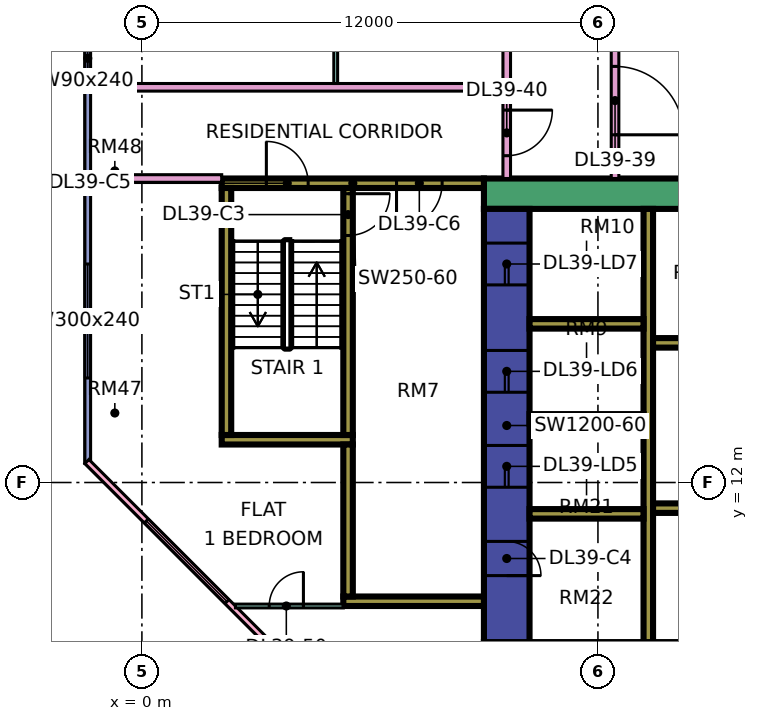
"""IFC4 building model, lengths in metres.
Left out: names, types, materials, properties, quantities, classifications, styles, units other than length and angle.
Written with IfcOpenShell. Run it as: python <this file> out.ifc"""

import sys

from ifc_helpers import new_model, si_unit, direction, frame, frame_2d, origin, place, context, subcontext, project, spatial, rectangle, extrude, element, fill, save


model = new_model("IFC4")
c1 = context("Model", 3, precision=1e-05, world=origin(), true_north=direction((0.0, 1.0)))
c2 = subcontext(c1, "Body", "Model", "MODEL_VIEW")
j1 = project(units=[si_unit("LENGTHUNIT", "METRE"), si_unit("PLANEANGLEUNIT", "RADIAN")], contexts=[c1])
p1 = place(None, origin())
s1 = spatial("IfcSite", under=j1, at=p1, CompositionType="ELEMENT")
p2 = place(p1, origin())
s2 = spatial("IfcBuilding", under=s1, at=p2, CompositionType="ELEMENT")
p3 = place(p2, frame((0.0, 0.0, 172.4)))
s3 = spatial("IfcBuildingStorey", under=s2, at=p3, CompositionType="ELEMENT", Elevation=172.4)
p4 = place(p3, frame((9.0, 19.6, 0.0), z_axis=(0.0, 0.0, 1.0), x_axis=(1.0, 0.0, 0.0)))
e1 = element("IfcWall", 1, at=p4, inside=s3, PredefinedType="SHEAR", context=c2, shape_type="SweptSolid", body=[
    extrude(rectangle(XDim=25.0, YDim=0.8, at=frame_2d((12.5, 0.0))), origin(), (0.0, 0.0, 1.0), 3.75),
])
p5 = place(p4, frame((19.1, 0.0, 0.0)))
e2 = element("IfcOpeningElement", 2, at=p5, cuts=e1, PredefinedType="OPENING", context=c2, shape_type="SweptSolid", body=[
    extrude(rectangle(XDim=1.8, YDim=2.4, at=frame_2d((0.9, 1.2))), frame((0.0, 0.41, 0.0), z_axis=(0.0, -1.0, 0.0), x_axis=(1.0, 0.0, 0.0)), (0.0, 0.0, 1.0), 0.82),
])
p6 = place(p3, frame((9.6, 7.8, 0.0), z_axis=(0.0, 0.0, 1.0), x_axis=(0.0, 1.0, 0.0)))
e3 = element("IfcWall", 3, at=p6, inside=s3, PredefinedType="SHEAR", context=c2, shape_type="SweptSolid", body=[
    extrude(rectangle(XDim=11.4, YDim=1.2, at=frame_2d((5.7, 0.0))), origin(), (0.0, 0.0, 1.0), 3.75),
])
p7 = place(p6, frame((4.075, 0.0, 0.0)))
e4 = element("IfcOpeningElement", 4, at=p7, cuts=e3, PredefinedType="OPENING", context=c2, shape_type="SweptSolid", body=[
    extrude(rectangle(XDim=1.1, YDim=2.2, at=frame_2d((0.55, 1.1))), frame((0.0, 0.61, 0.0), z_axis=(0.0, -1.0, 0.0), x_axis=(1.0, 0.0, 0.0)), (0.0, 0.0, 1.0), 1.22),
])
p8 = place(p6, frame((6.575, 0.0, 0.0)))
e5 = element("IfcOpeningElement", 5, at=p8, cuts=e3, PredefinedType="OPENING", context=c2, shape_type="SweptSolid", body=[
    extrude(rectangle(XDim=1.1, YDim=2.2, at=frame_2d((0.55, 1.1))), frame((0.0, 0.61, 0.0), z_axis=(0.0, -1.0, 0.0), x_axis=(1.0, 0.0, 0.0)), (0.0, 0.0, 1.0), 1.22),
])
p9 = place(p6, frame((9.4, 0.0, 0.0)))
e6 = element("IfcOpeningElement", 6, at=p9, cuts=e3, PredefinedType="OPENING", context=c2, shape_type="SweptSolid", body=[
    extrude(rectangle(XDim=1.1, YDim=2.2, at=frame_2d((0.55, 1.1))), frame((0.0, 0.61, 0.0), z_axis=(0.0, -1.0, 0.0), x_axis=(1.0, 0.0, 0.0)), (0.0, 0.0, 1.0), 1.22),
])
p10 = place(p6, frame((1.75, 0.0, 0.0)))
e7 = element("IfcOpeningElement", 7, at=p10, cuts=e3, PredefinedType="OPENING", context=c2, shape_type="SweptSolid", body=[
    extrude(rectangle(XDim=0.9, YDim=2.1, at=frame_2d((0.45, 1.05))), frame((0.0, 0.61, 0.0), z_axis=(0.0, -1.0, 0.0), x_axis=(1.0, 0.0, 0.0)), (0.0, 0.0, 1.0), 1.22),
])
p11 = place(p3, frame((13.325, 7.8, 0.0), z_axis=(0.0, 0.0, 1.0), x_axis=(0.0, 1.0, 0.0)))
e8 = element("IfcWall", 8, at=p11, inside=s3, PredefinedType="SHEAR", context=c2, shape_type="SweptSolid", body=[
    extrude(rectangle(XDim=11.4, YDim=0.25, at=frame_2d((5.7, 0.0))), origin(), (0.0, 0.0, 1.0), 3.75),
])
p12 = place(p3, frame((13.45, 11.325, 0.0), z_axis=(0.0, 0.0, 1.0), x_axis=(1.0, 0.0, 0.0)))
e9 = element("IfcWall", 9, at=p12, inside=s3, PredefinedType="SHEAR", context=c2, shape_type="SweptSolid", body=[
    extrude(rectangle(XDim=19.75, YDim=0.25, at=frame_2d((9.875, 0.0))), origin(), (0.0, 0.0, 1.0), 3.75),
])
p13 = place(p12, frame((11.65, 0.0, 0.0)))
e10 = element("IfcOpeningElement", 10, at=p13, cuts=e9, PredefinedType="OPENING", context=c2, shape_type="SweptSolid", body=[
    extrude(rectangle(XDim=1.2, YDim=2.2, at=frame_2d((0.6, 1.1))), frame((0.0, 0.135, 0.0), z_axis=(0.0, -1.0, 0.0), x_axis=(1.0, 0.0, 0.0)), (0.0, 0.0, 1.0), 0.27),
])
p14 = place(p12, frame((14.4, 0.0, 0.0)))
e11 = element("IfcOpeningElement", 11, at=p14, cuts=e9, PredefinedType="OPENING", context=c2, shape_type="SweptSolid", body=[
    extrude(rectangle(XDim=1.2, YDim=2.2, at=frame_2d((0.6, 1.1))), frame((0.0, 0.135, 0.0), z_axis=(0.0, -1.0, 0.0), x_axis=(1.0, 0.0, 0.0)), (0.0, 0.0, 1.0), 0.27),
])
p15 = place(p12, frame((17.15, 0.0, 0.0)))
e12 = element("IfcOpeningElement", 12, at=p15, cuts=e9, PredefinedType="OPENING", context=c2, shape_type="SweptSolid", body=[
    extrude(rectangle(XDim=1.2, YDim=2.2, at=frame_2d((0.6, 1.1))), frame((0.0, 0.135, 0.0), z_axis=(0.0, -1.0, 0.0), x_axis=(1.0, 0.0, 0.0)), (0.0, 0.0, 1.0), 0.27),
])
p16 = place(p12, frame((2.8, 0.0, 0.0)))
e13 = element("IfcOpeningElement", 13, at=p16, cuts=e9, PredefinedType="OPENING", context=c2, shape_type="SweptSolid", body=[
    extrude(rectangle(XDim=0.9, YDim=2.1, at=frame_2d((0.45, 1.05))), frame((0.0, 0.135, 0.0), z_axis=(0.0, -1.0, 0.0), x_axis=(1.0, 0.0, 0.0)), (0.0, 0.0, 1.0), 0.27),
])
p17 = place(p12, frame((8.175, 0.0, 0.0)))
e14 = element("IfcOpeningElement", 14, at=p17, cuts=e9, PredefinedType="OPENING", context=c2, shape_type="SweptSolid", body=[
    extrude(rectangle(XDim=0.9, YDim=2.1, at=frame_2d((0.45, 1.05))), frame((0.0, 0.135, 0.0), z_axis=(0.0, -1.0, 0.0), x_axis=(1.0, 0.0, 0.0)), (0.0, 0.0, 1.0), 0.27),
])
p18 = place(p3, frame((13.45, 15.675, 0.0), z_axis=(0.0, 0.0, 1.0), x_axis=(1.0, 0.0, 0.0)))
e15 = element("IfcWall", 15, at=p18, inside=s3, PredefinedType="SHEAR", context=c2, shape_type="SweptSolid", body=[
    extrude(rectangle(XDim=13.75, YDim=0.25, at=frame_2d((6.875, 0.0))), origin(), (0.0, 0.0, 1.0), 3.75),
])
p19 = place(p18, frame((11.65, 0.0, 0.0)))
e16 = element("IfcOpeningElement", 16, at=p19, cuts=e15, PredefinedType="OPENING", context=c2, shape_type="SweptSolid", body=[
    extrude(rectangle(XDim=1.2, YDim=2.2, at=frame_2d((0.6, 1.1))), frame((0.0, 0.135, 0.0), z_axis=(0.0, -1.0, 0.0), x_axis=(1.0, 0.0, 0.0)), (0.0, 0.0, 1.0), 0.27),
])
for number, where, z_axis, x_axis in (
    (17, (10.2, 11.175, 0.0), (0.0, 0.0, 1.0), (1.0, 0.0, 0.0)),
    (18, (10.2, 13.675, 0.0), (0.0, 0.0, 1.0), (1.0, 0.0, 0.0)),
    (19, (10.2, 16.175, 0.0), (0.0, 0.0, 1.0), (1.0, 0.0, 0.0)),
):
    element("IfcWall", number, at=place(p3, frame(where, z_axis=z_axis, x_axis=x_axis)), inside=s3, PredefinedType="SHEAR", context=c2, shape_type="SweptSolid", body=[
        extrude(rectangle(XDim=3.0, YDim=0.25, at=frame_2d((1.5, 0.0))), origin(), (0.0, 0.0, 1.0), 3.75),
    ])
p20 = place(p3, frame((2.1, 19.875, 0.0), z_axis=(0.0, 0.0, 1.0), x_axis=(1.0, 0.0, 0.0)))
e20 = element("IfcWall", 20, at=p20, inside=s3, PredefinedType="SHEAR", context=c2, shape_type="SweptSolid", body=[
    extrude(rectangle(XDim=6.9, YDim=0.25, at=frame_2d((3.45, 0.0))), origin(), (0.0, 0.0, 1.0), 3.75),
])
p21 = place(p20, frame((1.175, 0.0, 0.0)))
e21 = element("IfcOpeningElement", 21, at=p21, cuts=e20, PredefinedType="OPENING", context=c2, shape_type="SweptSolid", body=[
    extrude(rectangle(XDim=1.1, YDim=2.2, at=frame_2d((0.55, 1.1))), frame((0.0, 0.135, 0.0), z_axis=(0.0, -1.0, 0.0), x_axis=(1.0, 0.0, 0.0)), (0.0, 0.0, 1.0), 0.27),
])
p22 = place(p20, frame((4.6, 0.0, 0.0)))
e22 = element("IfcOpeningElement", 22, at=p22, cuts=e20, PredefinedType="OPENING", context=c2, shape_type="SweptSolid", body=[
    extrude(rectangle(XDim=1.2, YDim=2.2, at=frame_2d((0.6, 1.1))), frame((0.0, 0.135, 0.0), z_axis=(0.0, -1.0, 0.0), x_axis=(1.0, 0.0, 0.0)), (0.0, 0.0, 1.0), 0.27),
])
p23 = place(p3, frame((2.1, 13.125, 0.0), z_axis=(0.0, 0.0, 1.0), x_axis=(1.0, 0.0, 0.0)))
e23 = element("IfcWall", 23, at=p23, inside=s3, PredefinedType="SHEAR", context=c2, shape_type="SweptSolid", body=[
    extrude(rectangle(XDim=3.45, YDim=0.25, at=frame_2d((1.725, 0.0))), origin(), (0.0, 0.0, 1.0), 3.75),
])
p24 = place(p3, frame((2.225, 13.25, 0.0), z_axis=(0.0, 0.0, 1.0), x_axis=(0.0, 1.0, 0.0)))
e24 = element("IfcWall", 24, at=p24, inside=s3, PredefinedType="SHEAR", context=c2, shape_type="SweptSolid", body=[
    extrude(rectangle(XDim=6.5, YDim=0.25, at=frame_2d((3.25, 0.0))), origin(), (0.0, 0.0, 1.0), 3.75),
])
p25 = place(p3, frame((5.425, 13.25, 0.0), z_axis=(0.0, 0.0, 1.0), x_axis=(0.0, 1.0, 0.0)))
e25 = element("IfcWall", 25, at=p25, inside=s3, PredefinedType="SHEAR", context=c2, shape_type="SweptSolid", body=[
    extrude(rectangle(XDim=6.5, YDim=0.25, at=frame_2d((3.25, 0.0))), origin(), (0.0, 0.0, 1.0), 3.75),
])
p26 = place(p25, frame((5.25, 0.0, 0.0)))
e26 = element("IfcOpeningElement", 26, at=p26, cuts=e25, PredefinedType="OPENING", context=c2, shape_type="SweptSolid", body=[
    extrude(rectangle(XDim=1.1, YDim=2.2, at=frame_2d((0.55, 1.1))), frame((0.0, 0.135, 0.0), z_axis=(0.0, -1.0, 0.0), x_axis=(1.0, 0.0, 0.0)), (0.0, 0.0, 1.0), 0.27),
])
p27 = place(p3, frame((5.3, 8.875, 0.0), z_axis=(0.0, 0.0, 1.0), x_axis=(1.0, 0.0, 0.0)))
e27 = element("IfcWall", 27, at=p27, inside=s3, PredefinedType="SHEAR", context=c2, shape_type="SweptSolid", body=[
    extrude(rectangle(XDim=3.7, YDim=0.25, at=frame_2d((1.85, 0.0))), origin(), (0.0, 0.0, 1.0), 3.75),
])
p28 = place(p3, frame((5.425, 9.0, 0.0), z_axis=(0.0, 0.0, 1.0), x_axis=(0.0, 1.0, 0.0)))
e28 = element("IfcWall", 28, at=p28, inside=s3, PredefinedType="SHEAR", context=c2, shape_type="SweptSolid", body=[
    extrude(rectangle(XDim=4.0, YDim=0.25, at=frame_2d((2.0, 0.0))), origin(), (0.0, 0.0, 1.0), 3.75),
])
p29 = place(p3, frame((-1.425, 23.925, 0.0), z_axis=(0.0, 0.0, 1.0), x_axis=(0.0, -1.0, 0.0)))
e29 = element("IfcWall", 29, at=p29, inside=s3, PredefinedType="SOLIDWALL", context=c2, shape_type="SweptSolid", body=[
    extrude(rectangle(XDim=11.425, YDim=0.15, at=frame_2d((5.712, 0.0))), origin(), (0.0, 0.0, 1.0), 3.35),
])
p30 = place(p29, frame((0.312, 0.0, 0.45)))
e30 = element("IfcOpeningElement", 30, at=p30, cuts=e29, PredefinedType="OPENING", context=c2, shape_type="SweptSolid", body=[
    extrude(rectangle(XDim=0.9, YDim=2.4, at=frame_2d((0.45, 1.2))), frame((0.0, 0.085, 0.0), z_axis=(0.0, -1.0, 0.0), x_axis=(1.0, 0.0, 0.0)), (0.0, 0.0, 1.0), 0.17),
])
p31 = place(p29, frame((6.175, 0.0, 0.45)))
e31 = element("IfcOpeningElement", 31, at=p31, cuts=e29, PredefinedType="OPENING", context=c2, shape_type="SweptSolid", body=[
    extrude(rectangle(XDim=3.0, YDim=2.4, at=frame_2d((1.5, 1.2))), frame((0.0, 0.085, 0.0), z_axis=(0.0, -1.0, 0.0), x_axis=(1.0, 0.0, 0.0)), (0.0, 0.0, 1.0), 0.17),
])
p32 = place(p3, frame((-1.447, 12.553, 0.0), z_axis=(0.0, 0.0, 1.0), x_axis=(0.707106781187, -0.707106781187, 0.0)))
e32 = element("IfcWall", 32, at=p32, inside=s3, PredefinedType="SOLIDWALL", context=c2, shape_type="SweptSolid", body=[
    extrude(rectangle(XDim=19.799, YDim=0.15, at=frame_2d((9.899, 0.0))), origin(), (0.0, 0.0, 1.0), 3.35),
])
p33 = place(p32, frame((2.212, 0.0, 0.45)))
e33 = element("IfcOpeningElement", 33, at=p33, cuts=e32, PredefinedType="OPENING", context=c2, shape_type="SweptSolid", body=[
    extrude(rectangle(XDim=3.0, YDim=2.4, at=frame_2d((1.5, 1.2))), frame((0.0, 0.085, 0.0), z_axis=(0.0, -1.0, 0.0), x_axis=(1.0, 0.0, 0.0)), (0.0, 0.0, 1.0), 0.17),
])
p34 = place(p32, frame((10.216, 0.0, 0.45)))
e34 = element("IfcOpeningElement", 34, at=p34, cuts=e32, PredefinedType="OPENING", context=c2, shape_type="SweptSolid", body=[
    extrude(rectangle(XDim=3.0, YDim=2.4, at=frame_2d((1.5, 1.2))), frame((0.0, 0.085, 0.0), z_axis=(0.0, -1.0, 0.0), x_axis=(1.0, 0.0, 0.0)), (0.0, 0.0, 1.0), 0.17),
])
p35 = place(p3, frame((-1.35, 20.0, 0.0), z_axis=(0.0, 0.0, 1.0), x_axis=(1.0, 0.0, 0.0)))
e35 = element("IfcWall", 35, at=p35, inside=s3, PredefinedType="PARTITIONING", context=c2, shape_type="SweptSolid", body=[
    extrude(rectangle(XDim=3.45, YDim=0.2, at=frame_2d((1.725, 0.0))), origin(), (0.0, 0.0, 1.0), 3.35),
])
p36 = place(p3, frame((-1.35, 22.4, 0.0), z_axis=(0.0, 0.0, 1.0), x_axis=(1.0, 0.0, 0.0)))
e36 = element("IfcWall", 36, at=p36, inside=s3, PredefinedType="PARTITIONING", context=c2, shape_type="SweptSolid", body=[
    extrude(rectangle(XDim=10.85, YDim=0.2, at=frame_2d((5.425, 0.0))), origin(), (0.0, 0.0, 1.0), 3.35),
])
p37 = place(p3, frame((2.461, 8.75, 0.0), z_axis=(0.0, 0.0, 1.0), x_axis=(1.0, 0.0, 0.0)))
e37 = element("IfcWall", 37, at=p37, inside=s3, PredefinedType="PARTITIONING", context=c2, shape_type="SweptSolid", body=[
    extrude(rectangle(XDim=2.839, YDim=0.1, at=frame_2d((1.419, 0.0))), origin(), (0.0, 0.0, 1.0), 3.35),
])
p38 = place(p37, frame((0.889, 0.0, 0.0)))
e38 = element("IfcOpeningElement", 38, at=p38, cuts=e37, PredefinedType="OPENING", context=c2, shape_type="SweptSolid", body=[
    extrude(rectangle(XDim=0.9, YDim=2.1, at=frame_2d((0.45, 1.05))), frame((0.0, 0.06, 0.0), z_axis=(0.0, -1.0, 0.0), x_axis=(1.0, 0.0, 0.0)), (0.0, 0.0, 1.0), 0.12),
])
p39 = place(p3, frame((5.1, 22.5, 0.0), z_axis=(0.0, 0.0, 1.0), x_axis=(0.0, 1.0, 0.0)))
e39 = element("IfcWall", 39, at=p39, inside=s3, PredefinedType="PARTITIONING", context=c2, shape_type="SweptSolid", body=[
    extrude(rectangle(XDim=4.45, YDim=0.1, at=frame_2d((2.225, 0.0))), origin(), (0.0, 0.0, 1.0), 3.35),
])
p40 = place(p3, frame((9.6, 20.0, 0.0), z_axis=(0.0, 0.0, 1.0), x_axis=(0.0, 1.0, 0.0)))
e40 = element("IfcWall", 40, at=p40, inside=s3, PredefinedType="PARTITIONING", context=c2, shape_type="SweptSolid", body=[
    extrude(rectangle(XDim=42.926, YDim=0.2, at=frame_2d((21.463, 0.0))), origin(), (0.0, 0.0, 1.0), 3.35),
])
p41 = place(p40, frame((31.35, 0.0, 0.0)))
e41 = element("IfcOpeningElement", 41, at=p41, cuts=e40, PredefinedType="OPENING", context=c2, shape_type="SweptSolid", body=[
    extrude(rectangle(XDim=1.0, YDim=2.1, at=frame_2d((0.5, 1.05))), frame((0.0, 0.11, 0.0), z_axis=(0.0, -1.0, 0.0), x_axis=(1.0, 0.0, 0.0)), (0.0, 0.0, 1.0), 0.22),
])
p42 = place(p40, frame((0.6, 0.0, 0.0)))
e42 = element("IfcOpeningElement", 42, at=p42, cuts=e40, PredefinedType="OPENING", context=c2, shape_type="SweptSolid", body=[
    extrude(rectangle(XDim=1.2, YDim=2.1, at=frame_2d((0.6, 1.05))), frame((0.0, 0.11, 0.0), z_axis=(0.0, -1.0, 0.0), x_axis=(1.0, 0.0, 0.0)), (0.0, 0.0, 1.0), 0.22),
])
p43 = place(p40, frame((3.9, 0.0, 0.0)))
e43 = element("IfcOpeningElement", 43, at=p43, cuts=e40, PredefinedType="OPENING", context=c2, shape_type="SweptSolid", body=[
    extrude(rectangle(XDim=1.0, YDim=2.1, at=frame_2d((0.5, 1.05))), frame((0.0, 0.11, 0.0), z_axis=(0.0, -1.0, 0.0), x_axis=(1.0, 0.0, 0.0)), (0.0, 0.0, 1.0), 0.22),
])
p44 = place(p3, frame((12.45, 20.0, 0.0), z_axis=(0.0, 0.0, 1.0), x_axis=(0.0, 1.0, 0.0)))
e44 = element("IfcWall", 44, at=p44, inside=s3, PredefinedType="PARTITIONING", context=c2, shape_type="SweptSolid", body=[
    extrude(rectangle(XDim=43.0, YDim=0.2, at=frame_2d((21.5, 0.0))), origin(), (0.0, 0.0, 1.0), 3.35),
])
p45 = place(p44, frame((5.95, 0.0, 0.0)))
e45 = element("IfcOpeningElement", 45, at=p45, cuts=e44, PredefinedType="OPENING", context=c2, shape_type="SweptSolid", body=[
    extrude(rectangle(XDim=1.0, YDim=2.1, at=frame_2d((0.5, 1.05))), frame((0.0, 0.11, 0.0), z_axis=(0.0, -1.0, 0.0), x_axis=(1.0, 0.0, 0.0)), (0.0, 0.0, 1.0), 0.22),
])
p46 = place(p44, frame((12.0, 0.0, 0.0)))
e46 = element("IfcOpeningElement", 46, at=p46, cuts=e44, PredefinedType="OPENING", context=c2, shape_type="SweptSolid", body=[
    extrude(rectangle(XDim=1.0, YDim=2.1, at=frame_2d((0.5, 1.05))), frame((0.0, 0.11, 0.0), z_axis=(0.0, -1.0, 0.0), x_axis=(1.0, 0.0, 0.0)), (0.0, 0.0, 1.0), 0.22),
])
p47 = place(p44, frame((22.75, 0.0, 0.0)))
e47 = element("IfcOpeningElement", 47, at=p47, cuts=e44, PredefinedType="OPENING", context=c2, shape_type="SweptSolid", body=[
    extrude(rectangle(XDim=1.0, YDim=2.1, at=frame_2d((0.5, 1.05))), frame((0.0, 0.11, 0.0), z_axis=(0.0, -1.0, 0.0), x_axis=(1.0, 0.0, 0.0)), (0.0, 0.0, 1.0), 0.22),
])
p48 = place(p44, frame((34.75, 0.0, 0.0)))
e48 = element("IfcOpeningElement", 48, at=p48, cuts=e44, PredefinedType="OPENING", context=c2, shape_type="SweptSolid", body=[
    extrude(rectangle(XDim=1.0, YDim=2.1, at=frame_2d((0.5, 1.05))), frame((0.0, 0.11, 0.0), z_axis=(0.0, -1.0, 0.0), x_axis=(1.0, 0.0, 0.0)), (0.0, 0.0, 1.0), 0.22),
])
p49 = place(p44, frame((1.15, 0.0, 0.0)))
e49 = element("IfcOpeningElement", 49, at=p49, cuts=e44, PredefinedType="OPENING", context=c2, shape_type="SweptSolid", body=[
    extrude(rectangle(XDim=1.8, YDim=2.1, at=frame_2d((0.9, 1.05))), frame((0.0, 0.11, 0.0), z_axis=(0.0, -1.0, 0.0), x_axis=(1.0, 0.0, 0.0)), (0.0, 0.0, 1.0), 0.22),
])
p50 = place(p44, frame((28.6, 0.0, 0.0)))
e50 = element("IfcOpeningElement", 50, at=p50, cuts=e44, PredefinedType="OPENING", context=c2, shape_type="SweptSolid", body=[
    extrude(rectangle(XDim=1.8, YDim=2.1, at=frame_2d((0.9, 1.05))), frame((0.0, 0.11, 0.0), z_axis=(0.0, -1.0, 0.0), x_axis=(1.0, 0.0, 0.0)), (0.0, 0.0, 1.0), 0.22),
])
p51 = place(p30, origin())
e51 = element("IfcWindow", 51, at=p51, inside=s3, PartitioningType="SINGLE_PANEL", PredefinedType="WINDOW", context=c2, shape_type="SweptSolid", body=[
    extrude(rectangle(XDim=0.9, YDim=2.4, at=frame_2d((0.45, 1.2))), frame((0.0, 0.03, 0.0), z_axis=(0.0, -1.0, 0.0), x_axis=(1.0, 0.0, 0.0)), (0.0, 0.0, 1.0), 0.06),
])
fill(e30, e51)
p52 = place(p31, origin())
e52 = element("IfcWindow", 52, at=p52, inside=s3, PartitioningType="SINGLE_PANEL", PredefinedType="WINDOW", context=c2, shape_type="SweptSolid", body=[
    extrude(rectangle(XDim=3.0, YDim=2.4, at=frame_2d((1.5, 1.2))), frame((0.0, 0.03, 0.0), z_axis=(0.0, -1.0, 0.0), x_axis=(1.0, 0.0, 0.0)), (0.0, 0.0, 1.0), 0.06),
])
fill(e31, e52)
p53 = place(p33, origin())
e53 = element("IfcWindow", 53, at=p53, inside=s3, PartitioningType="SINGLE_PANEL", PredefinedType="WINDOW", context=c2, shape_type="SweptSolid", body=[
    extrude(rectangle(XDim=3.0, YDim=2.4, at=frame_2d((1.5, 1.2))), frame((0.0, 0.03, 0.0), z_axis=(0.0, -1.0, 0.0), x_axis=(1.0, 0.0, 0.0)), (0.0, 0.0, 1.0), 0.06),
])
fill(e33, e53)
p54 = place(p7, origin())
e54 = element("IfcDoor", 54, at=p54, inside=s3, OperationType="DOUBLE_DOOR_SLIDING", PredefinedType="DOOR", context=c2, shape_type="SweptSolid", body=[
    extrude(rectangle(XDim=1.1, YDim=2.2, at=frame_2d((0.55, 1.1))), frame((0.0, 0.025, 0.0), z_axis=(0.0, -1.0, 0.0), x_axis=(1.0, 0.0, 0.0)), (0.0, 0.0, 1.0), 0.05),
])
fill(e4, e54)
p55 = place(p8, origin())
e55 = element("IfcDoor", 55, at=p55, inside=s3, OperationType="DOUBLE_DOOR_SLIDING", PredefinedType="DOOR", context=c2, shape_type="SweptSolid", body=[
    extrude(rectangle(XDim=1.1, YDim=2.2, at=frame_2d((0.55, 1.1))), frame((0.0, 0.025, 0.0), z_axis=(0.0, -1.0, 0.0), x_axis=(1.0, 0.0, 0.0)), (0.0, 0.0, 1.0), 0.05),
])
fill(e5, e55)
p56 = place(p9, origin())
e56 = element("IfcDoor", 56, at=p56, inside=s3, OperationType="DOUBLE_DOOR_SLIDING", PredefinedType="DOOR", context=c2, shape_type="SweptSolid", body=[
    extrude(rectangle(XDim=1.1, YDim=2.2, at=frame_2d((0.55, 1.1))), frame((0.0, 0.025, 0.0), z_axis=(0.0, -1.0, 0.0), x_axis=(1.0, 0.0, 0.0)), (0.0, 0.0, 1.0), 0.05),
])
fill(e6, e56)
p57 = place(p26, origin())
e57 = element("IfcDoor", 57, at=p57, inside=s3, OperationType="SINGLE_SWING_RIGHT", PredefinedType="DOOR", context=c2, shape_type="SweptSolid", body=[
    extrude(rectangle(XDim=1.1, YDim=2.2, at=frame_2d((0.55, 1.1))), frame((0.0, 0.025, 0.0), z_axis=(0.0, -1.0, 0.0), x_axis=(1.0, 0.0, 0.0)), (0.0, 0.0, 1.0), 0.05),
])
fill(e26, e57)
p58 = place(p10, frame((0.9, 0.0, 0.0), z_axis=(0.0, 0.0, 1.0), x_axis=(-1.0, 0.0, 0.0)))
e58 = element("IfcDoor", 58, at=p58, inside=s3, OperationType="SINGLE_SWING_LEFT", PredefinedType="DOOR", context=c2, shape_type="SweptSolid", body=[
    extrude(rectangle(XDim=0.9, YDim=2.1, at=frame_2d((0.45, 1.05))), frame((0.0, 0.025, 0.0), z_axis=(0.0, -1.0, 0.0), x_axis=(1.0, 0.0, 0.0)), (0.0, 0.0, 1.0), 0.05),
])
fill(e7, e58)
p59 = place(p21, origin())
e59 = element("IfcDoor", 59, at=p59, inside=s3, OperationType="SINGLE_SWING_LEFT", PredefinedType="DOOR", context=c2, shape_type="SweptSolid", body=[
    extrude(rectangle(XDim=1.1, YDim=2.2, at=frame_2d((0.55, 1.1))), frame((0.0, 0.025, 0.0), z_axis=(0.0, -1.0, 0.0), x_axis=(1.0, 0.0, 0.0)), (0.0, 0.0, 1.0), 0.05),
])
fill(e21, e59)
p60 = place(p22, frame((1.2, 0.0, 0.0), z_axis=(0.0, 0.0, 1.0), x_axis=(-1.0, 0.0, 0.0)))
e60 = element("IfcDoor", 60, at=p60, inside=s3, OperationType="SINGLE_SWING_LEFT", PredefinedType="DOOR", context=c2, shape_type="SweptSolid", body=[
    extrude(rectangle(XDim=1.2, YDim=2.2, at=frame_2d((0.6, 1.1))), frame((0.0, 0.025, 0.0), z_axis=(0.0, -1.0, 0.0), x_axis=(1.0, 0.0, 0.0)), (0.0, 0.0, 1.0), 0.05),
])
fill(e22, e60)
p61 = place(p49, frame((1.8, 0.0, 0.0), z_axis=(0.0, 0.0, 1.0), x_axis=(-1.0, 0.0, 0.0)))
e61 = element("IfcDoor", 61, at=p61, inside=s3, OperationType="DOUBLE_DOOR_SINGLE_SWING", PredefinedType="DOOR", context=c2, shape_type="SweptSolid", body=[
    extrude(rectangle(XDim=1.8, YDim=2.1, at=frame_2d((0.9, 1.05))), frame((0.0, 0.025, 0.0), z_axis=(0.0, -1.0, 0.0), x_axis=(1.0, 0.0, 0.0)), (0.0, 0.0, 1.0), 0.05),
])
fill(e49, e61)
p62 = place(p42, origin())
e62 = element("IfcDoor", 62, at=p62, inside=s3, OperationType="SINGLE_SWING_RIGHT", PredefinedType="DOOR", context=c2, shape_type="SweptSolid", body=[
    extrude(rectangle(XDim=1.2, YDim=2.1, at=frame_2d((0.6, 1.05))), frame((0.0, 0.025, 0.0), z_axis=(0.0, -1.0, 0.0), x_axis=(1.0, 0.0, 0.0)), (0.0, 0.0, 1.0), 0.05),
])
fill(e42, e62)
p63 = place(p38, frame((0.9, 0.0, 0.0), z_axis=(0.0, 0.0, 1.0), x_axis=(-1.0, 0.0, 0.0)))
e63 = element("IfcDoor", 63, at=p63, inside=s3, OperationType="SINGLE_SWING_RIGHT", PredefinedType="DOOR", context=c2, shape_type="SweptSolid", body=[
    extrude(rectangle(XDim=0.9, YDim=2.1, at=frame_2d((0.45, 1.05))), frame((0.0, 0.025, 0.0), z_axis=(0.0, -1.0, 0.0), x_axis=(1.0, 0.0, 0.0)), (0.0, 0.0, 1.0), 0.05),
])
fill(e38, e63)
save(model, sys.argv[1])
